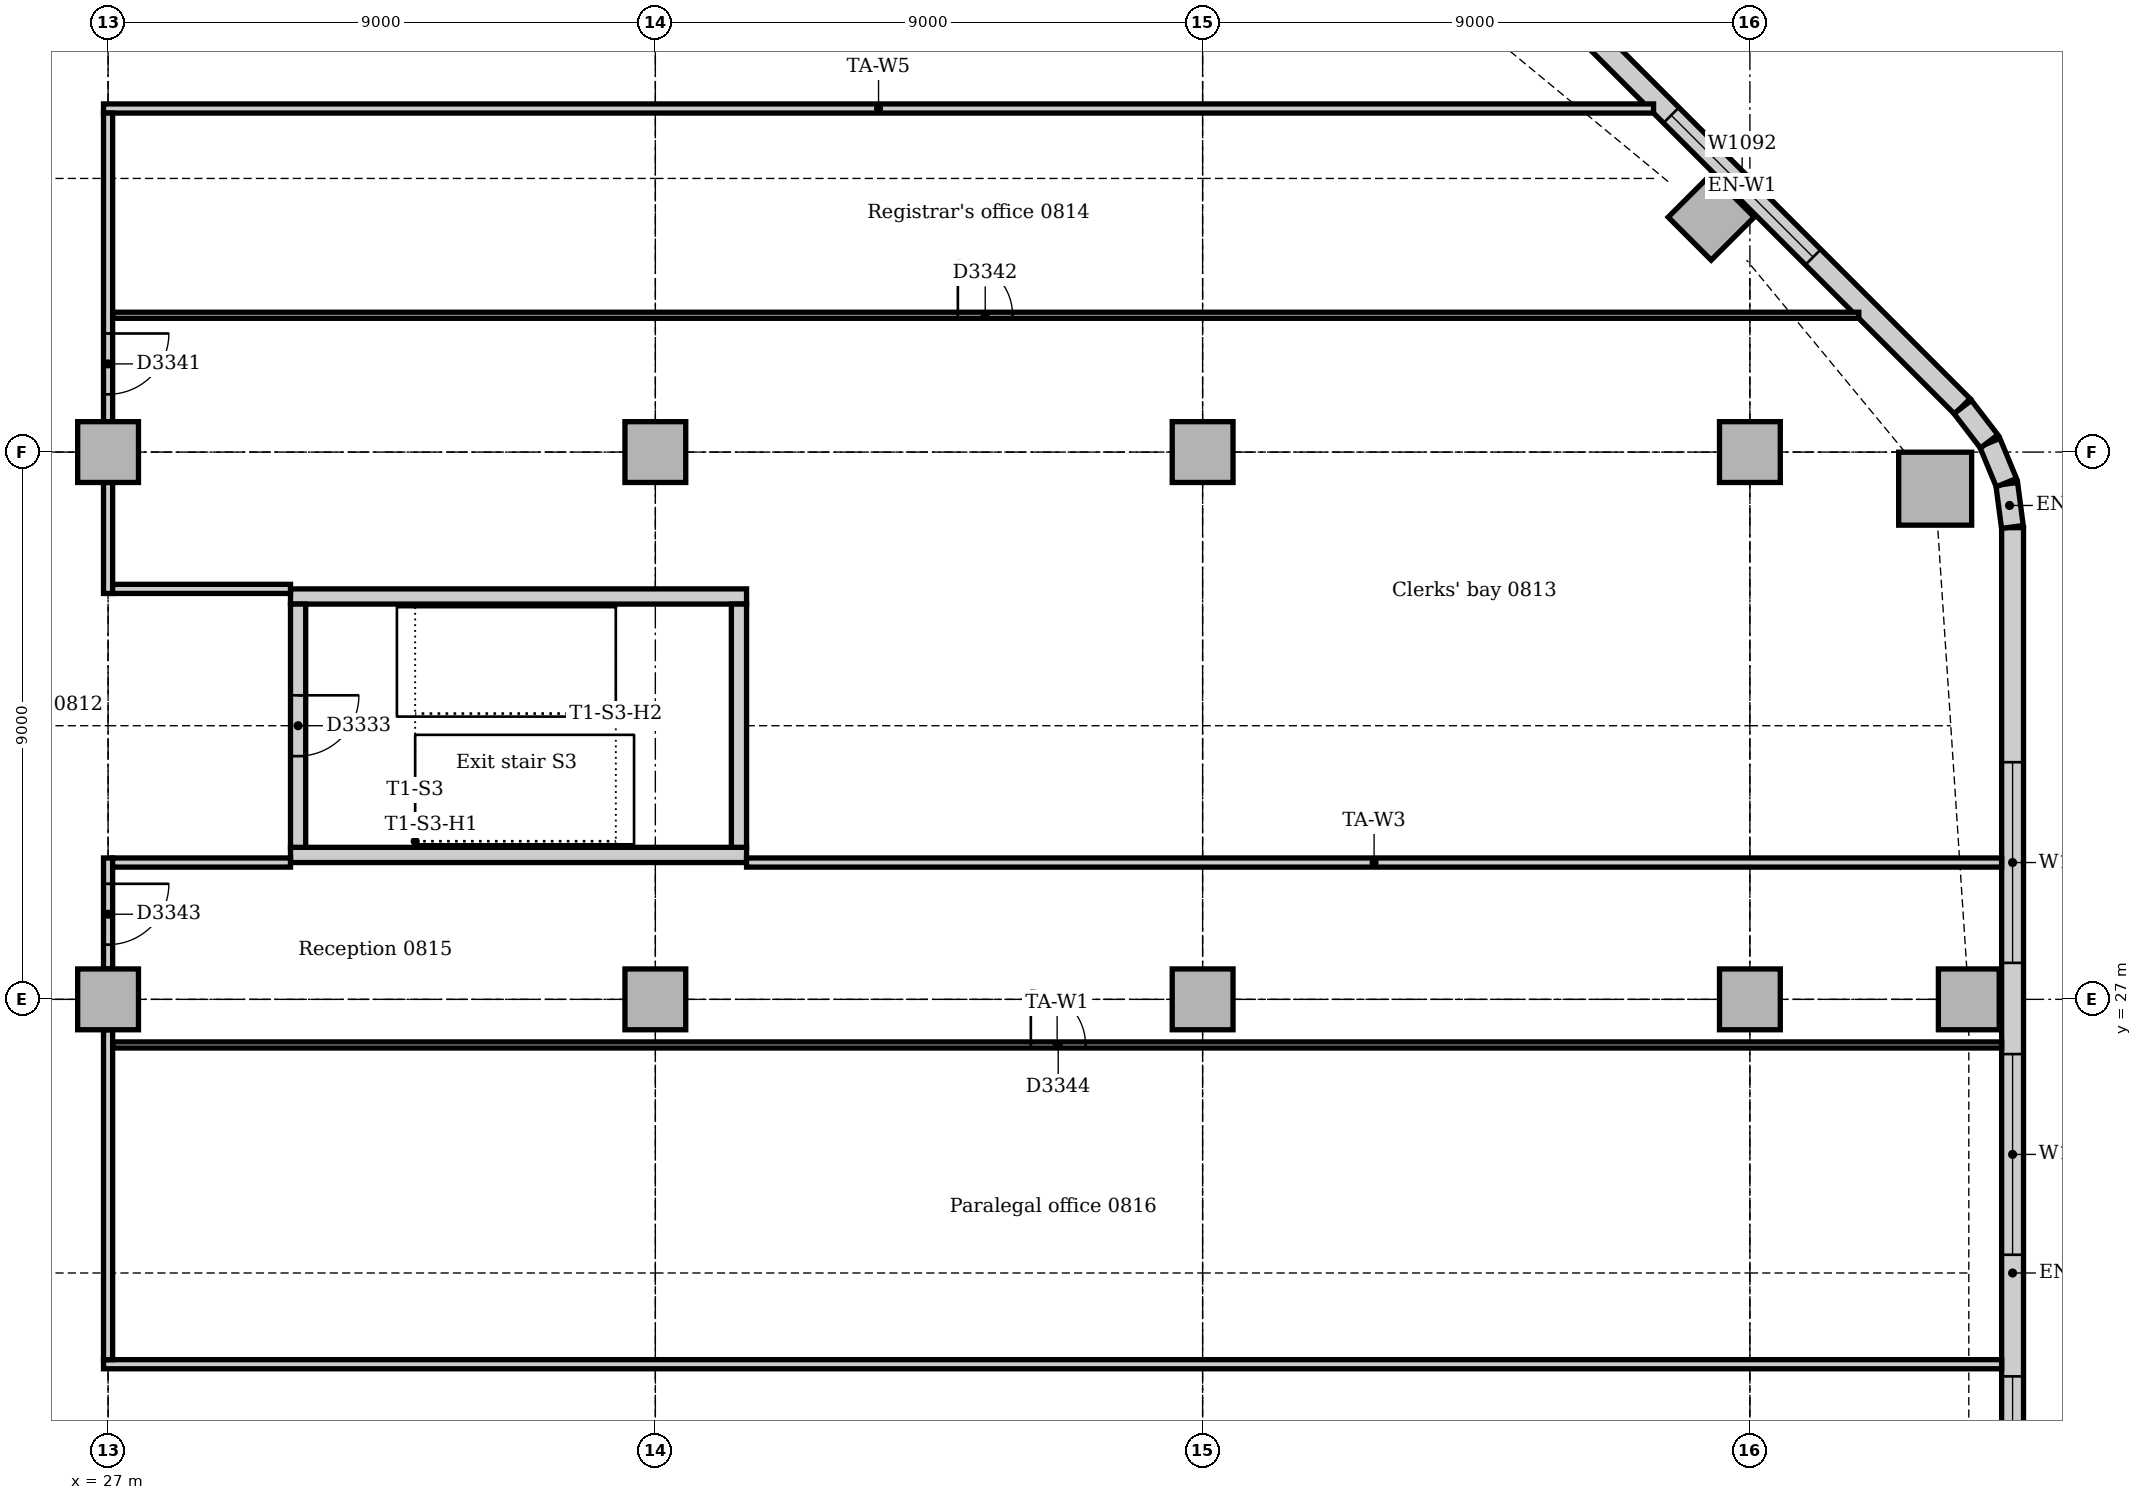
"""IFC4 building model, lengths in metres.
Left out: names, types, materials, properties, quantities, classifications, styles, units other than length and angle.
Written with IfcOpenShell. Run it as: python <this file> out.ifc"""

import sys

from ifc_helpers import new_model, si_unit, direction, frame, frame_2d, origin, origin_2d, place, context, subcontext, project, spatial, rectangle, extrude, element, fill, save


model = new_model("IFC4")
c1 = context("Model", 3, precision=1e-05, world=origin(), true_north=direction((0.0, 1.0)))
c2 = subcontext(c1, "Body", "Model", "MODEL_VIEW")
j1 = project(units=[si_unit("LENGTHUNIT", "METRE"), si_unit("PLANEANGLEUNIT", "RADIAN")], contexts=[c1])
p1 = place(None, origin())
s1 = spatial("IfcSite", under=j1, at=p1, CompositionType="ELEMENT")
p2 = place(p1, origin())
s2 = spatial("IfcBuilding", under=s1, at=p2, CompositionType="ELEMENT")
p3 = place(p2, frame((0.0, 0.0, 38.0)))
s3 = spatial("IfcBuildingStorey", under=s2, at=p3, CompositionType="ELEMENT", Elevation=38.0)
for number, where, z_axis, x_axis in (
    (1, (30.0, 29.375, 0.0), (0.0, 0.0, 1.0), (1.0, 0.0, 0.0)),
    (2, (37.5, 33.625, 0.0), (0.0, 0.0, 1.0), (-1.0, 0.0, 0.0)),
):
    element("IfcWall", number, at=place(p3, frame(where, z_axis=z_axis, x_axis=x_axis)), inside=s3, PredefinedType="SOLIDWALL", context=c2, shape_type="SweptSolid", body=[
        extrude(rectangle(XDim=7.5, YDim=0.25, at=frame_2d((3.75, 0.0))), origin(), (0.0, 0.0, 1.0), 4.0),
    ])
p4 = place(p3, frame((37.375, 29.5, 0.0), z_axis=(0.0, 0.0, 1.0), x_axis=(0.0, 1.0, 0.0)))
e3 = element("IfcWall", 3, at=p4, inside=s3, PredefinedType="SOLIDWALL", context=c2, shape_type="SweptSolid", body=[
    extrude(rectangle(XDim=4.0, YDim=0.25, at=frame_2d((2.0, 0.0))), origin(), (0.0, 0.0, 1.0), 4.0),
])
p5 = place(p3, frame((30.125, 33.5, 0.0), z_axis=(0.0, 0.0, 1.0), x_axis=(0.0, -1.0, 0.0)))
e4 = element("IfcWall", 4, at=p5, inside=s3, PredefinedType="SOLIDWALL", context=c2, shape_type="SweptSolid", body=[
    extrude(rectangle(XDim=4.0, YDim=0.25, at=frame_2d((2.0, 0.0))), origin(), (0.0, 0.0, 1.0), 4.0),
])
p6 = place(p5, frame((1.5, 0.0, 0.0)))
e5 = element("IfcOpeningElement", 5, at=p6, cuts=e4, PredefinedType="OPENING", context=c2, shape_type="SweptSolid", body=[
    extrude(rectangle(XDim=1.0, YDim=2.1, at=frame_2d((0.5, 1.05))), frame((0.0, 0.135, 0.0), z_axis=(0.0, -1.0, 0.0), x_axis=(1.0, 0.0, 0.0)), (0.0, 0.0, 1.0), 0.27),
])
p7 = place(p3, frame((57.047, 35.398, 0.0), z_axis=(0.0, 0.0, 1.0), x_axis=(1.0, 0.0, 0.0)))
e6 = element("IfcColumn", 6, at=p7, inside=s3, PredefinedType="COLUMN", context=c2, shape_type="SweptSolid", body=[
    extrude(rectangle(XDim=1.2, YDim=1.2, at=origin_2d()), origin(), (0.0, 0.0, 1.0), 3.85),
])
for number, where, z_axis, x_axis in (
    (7, (57.6, 27.0, 0.0), (0.0, 0.0, 1.0), (1.0, 0.0, 0.0)),
    (8, (53.364, 39.864, 0.0), (0.0, 0.0, 1.0), (0.707, 0.707, 0.0)),
    (9, (27.0, 27.0, 0.0), (0.0, 0.0, 1.0), (1.0, 0.0, 0.0)),
    (10, (27.0, 36.0, 0.0), (0.0, 0.0, 1.0), (1.0, 0.0, 0.0)),
    (11, (36.0, 27.0, 0.0), (0.0, 0.0, 1.0), (1.0, 0.0, 0.0)),
    (12, (36.0, 36.0, 0.0), (0.0, 0.0, 1.0), (1.0, 0.0, 0.0)),
    (13, (45.0, 27.0, 0.0), (0.0, 0.0, 1.0), (1.0, 0.0, 0.0)),
    (14, (45.0, 36.0, 0.0), (0.0, 0.0, 1.0), (1.0, 0.0, 0.0)),
    (15, (54.0, 27.0, 0.0), (0.0, 0.0, 1.0), (1.0, 0.0, 0.0)),
    (16, (54.0, 36.0, 0.0), (0.0, 0.0, 1.0), (1.0, 0.0, 0.0)),
):
    element("IfcColumn", number, at=place(p3, frame(where, z_axis=z_axis, x_axis=x_axis)), inside=s3, PredefinedType="COLUMN", context=c2, shape_type="SweptSolid", body=[
        extrude(rectangle(XDim=1.0, YDim=1.0, at=origin_2d()), origin(), (0.0, 0.0, 1.0), 3.85),
    ])
p8 = place(p3, frame((58.32, 10.243, 0.0), z_axis=(0.0, 0.0, 1.0), x_axis=(0.0, 1.0, 0.0)))
e17 = element("IfcWall", 17, at=p8, inside=s3, PredefinedType="STANDARD", context=c2, shape_type="SweptSolid", body=[
    extrude(rectangle(XDim=24.515, YDim=0.36, at=frame_2d((12.257, 0.0))), origin(), (0.0, 0.0, 1.0), 3.85),
])
p9 = place(p8, frame((4.907, 0.0, 0.9)))
e18 = element("IfcOpeningElement", 18, at=p9, cuts=e17, PredefinedType="OPENING", context=c2, shape_type="SweptSolid", body=[
    extrude(rectangle(XDim=1.8, YDim=1.6, at=frame_2d((0.9, 0.8))), frame((0.0, 0.19, 0.0), z_axis=(0.0, -1.0, 0.0), x_axis=(1.0, 0.0, 0.0)), (0.0, 0.0, 1.0), 0.38),
])
p10 = place(p8, frame((8.757, 0.0, 0.9)))
e19 = element("IfcOpeningElement", 19, at=p10, cuts=e17, PredefinedType="OPENING", context=c2, shape_type="SweptSolid", body=[
    extrude(rectangle(XDim=1.8, YDim=1.6, at=frame_2d((0.9, 0.8))), frame((0.0, 0.19, 0.0), z_axis=(0.0, -1.0, 0.0), x_axis=(1.0, 0.0, 0.0)), (0.0, 0.0, 1.0), 0.38),
])
p11 = place(p8, frame((12.557, 0.0, 0.9)))
e20 = element("IfcOpeningElement", 20, at=p11, cuts=e17, PredefinedType="OPENING", context=c2, shape_type="SweptSolid", body=[
    extrude(rectangle(XDim=3.3, YDim=1.6, at=frame_2d((1.65, 0.8))), frame((0.0, 0.19, 0.0), z_axis=(0.0, -1.0, 0.0), x_axis=(1.0, 0.0, 0.0)), (0.0, 0.0, 1.0), 0.38),
])
p12 = place(p8, frame((17.357, 0.0, 0.9)))
e21 = element("IfcOpeningElement", 21, at=p12, cuts=e17, PredefinedType="OPENING", context=c2, shape_type="SweptSolid", body=[
    extrude(rectangle(XDim=3.3, YDim=1.6, at=frame_2d((1.65, 0.8))), frame((0.0, 0.19, 0.0), z_axis=(0.0, -1.0, 0.0), x_axis=(1.0, 0.0, 0.0)), (0.0, 0.0, 1.0), 0.38),
])
p13 = place(p3, frame((57.494, 36.751, 0.0), z_axis=(0.0, 0.0, 1.0), x_axis=(-0.707106781187, 0.707106781187, 0.0)))
e22 = element("IfcWall", 22, at=p13, inside=s3, PredefinedType="STANDARD", context=c2, shape_type="SweptSolid", body=[
    extrude(rectangle(XDim=10.243, YDim=0.36, at=frame_2d((5.121, 0.0))), origin(), (0.0, 0.0, 1.0), 3.85),
])
p14 = place(p13, frame((3.471, 0.0, 0.9)))
e23 = element("IfcOpeningElement", 23, at=p14, cuts=e22, PredefinedType="OPENING", context=c2, shape_type="SweptSolid", body=[
    extrude(rectangle(XDim=3.3, YDim=1.6, at=frame_2d((1.65, 0.8))), frame((0.0, 0.19, 0.0), z_axis=(0.0, -1.0, 0.0), x_axis=(1.0, 0.0, 0.0)), (0.0, 0.0, 1.0), 0.38),
])
for number, where, z_axis, x_axis in (
    (24, (58.317, 34.769, 0.0), (0.0, 0.0, 1.0), (-0.131, 0.991, 0.0)),
    (25, (58.218, 35.497, 0.0), (0.0, 0.0, 1.0), (-0.383, 0.924, 0.0)),
):
    element("IfcWall", number, at=place(p3, frame(where, z_axis=z_axis, x_axis=x_axis)), inside=s3, PredefinedType="STANDARD", context=c2, shape_type="SweptSolid", body=[
        extrude(rectangle(XDim=0.713, YDim=0.36, at=frame_2d((0.356, 0.0))), origin(), (0.0, 0.0, 1.0), 3.85),
    ])
p15 = place(p3, frame((57.934, 36.175, 0.0), z_axis=(0.0, 0.0, 1.0), x_axis=(-0.608802368033, 0.793321924995, 0.0)))
e26 = element("IfcWall", 26, at=p15, inside=s3, PredefinedType="STANDARD", context=c2, shape_type="SweptSolid", body=[
    extrude(rectangle(XDim=0.713, YDim=0.36, at=frame_2d((0.357, 0.0))), origin(), (0.0, 0.0, 1.0), 3.85),
])
p16 = place(p3, frame((26.925, 21.0, 0.0), z_axis=(0.0, 0.0, 1.0), x_axis=(1.0, 0.0, 0.0)))
e27 = element("IfcWall", 27, at=p16, inside=s3, PredefinedType="PARTITIONING", context=c2, shape_type="SweptSolid", body=[
    extrude(rectangle(XDim=31.215, YDim=0.15, at=frame_2d((15.607, 0.0))), origin(), (0.0, 0.0, 1.0), 3.85),
])
p17 = place(p3, frame((26.925, 41.65, 0.0), z_axis=(0.0, 0.0, 1.0), x_axis=(1.0, 0.0, 0.0)))
e28 = element("IfcWall", 28, at=p17, inside=s3, PredefinedType="PARTITIONING", context=c2, shape_type="SweptSolid", body=[
    extrude(rectangle(XDim=25.491, YDim=0.15, at=frame_2d((12.745, 0.0))), origin(), (0.0, 0.0, 1.0), 3.85),
])
p18 = place(p3, frame((27.0, 21.075, 0.0), z_axis=(0.0, 0.0, 1.0), x_axis=(0.0, 1.0, 0.0)))
e29 = element("IfcWall", 29, at=p18, inside=s3, PredefinedType="PARTITIONING", context=c2, shape_type="SweptSolid", body=[
    extrude(rectangle(XDim=5.425, YDim=0.15, at=frame_2d((2.712, 0.0))), origin(), (0.0, 0.0, 1.0), 3.158),
])
p19 = place(p3, frame((27.0, 27.5, 0.0), z_axis=(0.0, 0.0, 1.0), x_axis=(0.0, 1.0, 0.0)))
e30 = element("IfcWall", 30, at=p19, inside=s3, PredefinedType="PARTITIONING", context=c2, shape_type="SweptSolid", body=[
    extrude(rectangle(XDim=1.825, YDim=0.15, at=frame_2d((0.912, 0.0))), origin(), (0.0, 0.0, 1.0), 3.158),
])
p20 = place(p19, frame((0.4, 0.0, 0.0)))
e31 = element("IfcOpeningElement", 31, at=p20, cuts=e30, PredefinedType="OPENING", context=c2, shape_type="SweptSolid", body=[
    extrude(rectangle(XDim=1.0, YDim=2.1, at=frame_2d((0.5, 1.05))), frame((0.0, 0.085, 0.0), z_axis=(0.0, -1.0, 0.0), x_axis=(1.0, 0.0, 0.0)), (0.0, 0.0, 1.0), 0.17),
])
p21 = place(p3, frame((27.0, 33.675, 0.0), z_axis=(0.0, 0.0, 1.0), x_axis=(0.0, 1.0, 0.0)))
e32 = element("IfcWall", 32, at=p21, inside=s3, PredefinedType="PARTITIONING", context=c2, shape_type="SweptSolid", body=[
    extrude(rectangle(XDim=1.825, YDim=0.15, at=frame_2d((0.912, 0.0))), origin(), (0.0, 0.0, 1.0), 3.158),
])
p22 = place(p3, frame((27.0, 36.5, 0.0), z_axis=(0.0, 0.0, 1.0), x_axis=(0.0, 1.0, 0.0)))
e33 = element("IfcWall", 33, at=p22, inside=s3, PredefinedType="PARTITIONING", context=c2, shape_type="SweptSolid", body=[
    extrude(rectangle(XDim=5.075, YDim=0.15, at=frame_2d((2.538, 0.0))), origin(), (0.0, 0.0, 1.0), 3.158),
])
p23 = place(p22, frame((0.45, 0.0, 0.0)))
e34 = element("IfcOpeningElement", 34, at=p23, cuts=e33, PredefinedType="OPENING", context=c2, shape_type="SweptSolid", body=[
    extrude(rectangle(XDim=1.0, YDim=2.1, at=frame_2d((0.5, 1.05))), frame((0.0, 0.085, 0.0), z_axis=(0.0, -1.0, 0.0), x_axis=(1.0, 0.0, 0.0)), (0.0, 0.0, 1.0), 0.17),
])
for number, where, z_axis, x_axis in (
    (35, (27.075, 29.25, 0.0), (0.0, 0.0, 1.0), (1.0, 0.0, 0.0)),
    (36, (27.075, 33.75, 0.0), (0.0, 0.0, 1.0), (1.0, 0.0, 0.0)),
):
    element("IfcWall", number, at=place(p3, frame(where, z_axis=z_axis, x_axis=x_axis)), inside=s3, PredefinedType="PARTITIONING", context=c2, shape_type="SweptSolid", body=[
        extrude(rectangle(XDim=2.925, YDim=0.15, at=frame_2d((1.462, 0.0))), origin(), (0.0, 0.0, 1.0), 3.85),
    ])
p24 = place(p3, frame((37.5, 29.25, 0.0), z_axis=(0.0, 0.0, 1.0), x_axis=(1.0, 0.0, 0.0)))
e37 = element("IfcWall", 37, at=p24, inside=s3, PredefinedType="PARTITIONING", context=c2, shape_type="SweptSolid", body=[
    extrude(rectangle(XDim=20.64, YDim=0.15, at=frame_2d((10.32, 0.0))), origin(), (0.0, 0.0, 1.0), 3.85),
])
p25 = place(p3, frame((27.075, 26.25, 0.0), z_axis=(0.0, 0.0, 1.0), x_axis=(1.0, 0.0, 0.0)))
e38 = element("IfcWall", 38, at=p25, inside=s3, PredefinedType="PARTITIONING", context=c2, shape_type="SweptSolid", body=[
    extrude(rectangle(XDim=31.065, YDim=0.1, at=frame_2d((15.533, 0.0))), origin(), (0.0, 0.0, 1.0), 3.85),
])
p26 = place(p25, frame((15.1, 0.0, 0.0)))
e39 = element("IfcOpeningElement", 39, at=p26, cuts=e38, PredefinedType="OPENING", context=c2, shape_type="SweptSolid", body=[
    extrude(rectangle(XDim=0.9, YDim=2.1, at=frame_2d((0.45, 1.05))), frame((0.0, 0.06, 0.0), z_axis=(0.0, -1.0, 0.0), x_axis=(1.0, 0.0, 0.0)), (0.0, 0.0, 1.0), 0.12),
])
p27 = place(p3, frame((27.075, 38.25, 0.0), z_axis=(0.0, 0.0, 1.0), x_axis=(1.0, 0.0, 0.0)))
e40 = element("IfcWall", 40, at=p27, inside=s3, PredefinedType="PARTITIONING", context=c2, shape_type="SweptSolid", body=[
    extrude(rectangle(XDim=28.716, YDim=0.1, at=frame_2d((14.358, 0.0))), origin(), (0.0, 0.0, 1.0), 3.85),
])
p28 = place(p27, frame((13.9, 0.0, 0.0)))
e41 = element("IfcOpeningElement", 41, at=p28, cuts=e40, PredefinedType="OPENING", context=c2, shape_type="SweptSolid", body=[
    extrude(rectangle(XDim=0.9, YDim=2.1, at=frame_2d((0.45, 1.05))), frame((0.0, 0.06, 0.0), z_axis=(0.0, -1.0, 0.0), x_axis=(1.0, 0.0, 0.0)), (0.0, 0.0, 1.0), 0.12),
])
p29 = place(p10, origin())
e42 = element("IfcWindow", 42, at=p29, inside=s3, PartitioningType="SINGLE_PANEL", PredefinedType="WINDOW", context=c2, shape_type="SweptSolid", body=[
    extrude(rectangle(XDim=1.8, YDim=1.6, at=frame_2d((0.9, 0.8))), frame((0.0, 0.13, 0.0), z_axis=(0.0, -1.0, 0.0), x_axis=(1.0, 0.0, 0.0)), (0.0, 0.0, 1.0), 0.06),
])
fill(e19, e42)
p30 = place(p11, origin())
e43 = element("IfcWindow", 43, at=p30, inside=s3, PartitioningType="SINGLE_PANEL", PredefinedType="WINDOW", context=c2, shape_type="SweptSolid", body=[
    extrude(rectangle(XDim=3.3, YDim=1.6, at=frame_2d((1.65, 0.8))), frame((0.0, 0.13, 0.0), z_axis=(0.0, -1.0, 0.0), x_axis=(1.0, 0.0, 0.0)), (0.0, 0.0, 1.0), 0.06),
])
fill(e20, e43)
p31 = place(p12, origin())
e44 = element("IfcWindow", 44, at=p31, inside=s3, PartitioningType="SINGLE_PANEL", PredefinedType="WINDOW", context=c2, shape_type="SweptSolid", body=[
    extrude(rectangle(XDim=3.3, YDim=1.6, at=frame_2d((1.65, 0.8))), frame((0.0, 0.13, 0.0), z_axis=(0.0, -1.0, 0.0), x_axis=(1.0, 0.0, 0.0)), (0.0, 0.0, 1.0), 0.06),
])
fill(e21, e44)
p32 = place(p14, origin())
e45 = element("IfcWindow", 45, at=p32, inside=s3, PartitioningType="SINGLE_PANEL", PredefinedType="WINDOW", context=c2, shape_type="SweptSolid", body=[
    extrude(rectangle(XDim=3.3, YDim=1.6, at=frame_2d((1.65, 0.8))), frame((0.0, 0.13, 0.0), z_axis=(0.0, -1.0, 0.0), x_axis=(1.0, 0.0, 0.0)), (0.0, 0.0, 1.0), 0.06),
])
fill(e23, e45)
p33 = place(p6, origin())
e46 = element("IfcDoor", 46, at=p33, inside=s3, OperationType="SINGLE_SWING_LEFT", PredefinedType="DOOR", context=c2, shape_type="SweptSolid", body=[
    extrude(rectangle(XDim=1.0, YDim=2.1, at=frame_2d((0.5, 1.05))), frame((0.0, 0.025, 0.0), z_axis=(0.0, -1.0, 0.0), x_axis=(1.0, 0.0, 0.0)), (0.0, 0.0, 1.0), 0.05),
])
fill(e5, e46)
p34 = place(p23, frame((1.0, 0.0, 0.0), z_axis=(0.0, 0.0, 1.0), x_axis=(-1.0, 0.0, 0.0)))
e47 = element("IfcDoor", 47, at=p34, inside=s3, OperationType="SINGLE_SWING_LEFT", PredefinedType="DOOR", context=c2, shape_type="SweptSolid", body=[
    extrude(rectangle(XDim=1.0, YDim=2.1, at=frame_2d((0.5, 1.05))), frame((0.0, 0.025, 0.0), z_axis=(0.0, -1.0, 0.0), x_axis=(1.0, 0.0, 0.0)), (0.0, 0.0, 1.0), 0.05),
])
fill(e34, e47)
p35 = place(p28, origin())
e48 = element("IfcDoor", 48, at=p35, inside=s3, OperationType="SINGLE_SWING_LEFT", PredefinedType="DOOR", context=c2, shape_type="SweptSolid", body=[
    extrude(rectangle(XDim=0.9, YDim=2.1, at=frame_2d((0.45, 1.05))), frame((0.0, 0.025, 0.0), z_axis=(0.0, -1.0, 0.0), x_axis=(1.0, 0.0, 0.0)), (0.0, 0.0, 1.0), 0.05),
])
fill(e41, e48)
p36 = place(p20, frame((1.0, 0.0, 0.0), z_axis=(0.0, 0.0, 1.0), x_axis=(-1.0, 0.0, 0.0)))
e49 = element("IfcDoor", 49, at=p36, inside=s3, OperationType="SINGLE_SWING_LEFT", PredefinedType="DOOR", context=c2, shape_type="SweptSolid", body=[
    extrude(rectangle(XDim=1.0, YDim=2.1, at=frame_2d((0.5, 1.05))), frame((0.0, 0.025, 0.0), z_axis=(0.0, -1.0, 0.0), x_axis=(1.0, 0.0, 0.0)), (0.0, 0.0, 1.0), 0.05),
])
fill(e31, e49)
p37 = place(p26, origin())
e50 = element("IfcDoor", 50, at=p37, inside=s3, OperationType="SINGLE_SWING_LEFT", PredefinedType="DOOR", context=c2, shape_type="SweptSolid", body=[
    extrude(rectangle(XDim=0.9, YDim=2.1, at=frame_2d((0.45, 1.05))), frame((0.0, 0.025, 0.0), z_axis=(0.0, -1.0, 0.0), x_axis=(1.0, 0.0, 0.0)), (0.0, 0.0, 1.0), 0.05),
])
fill(e39, e50)
save(model, sys.argv[1])
